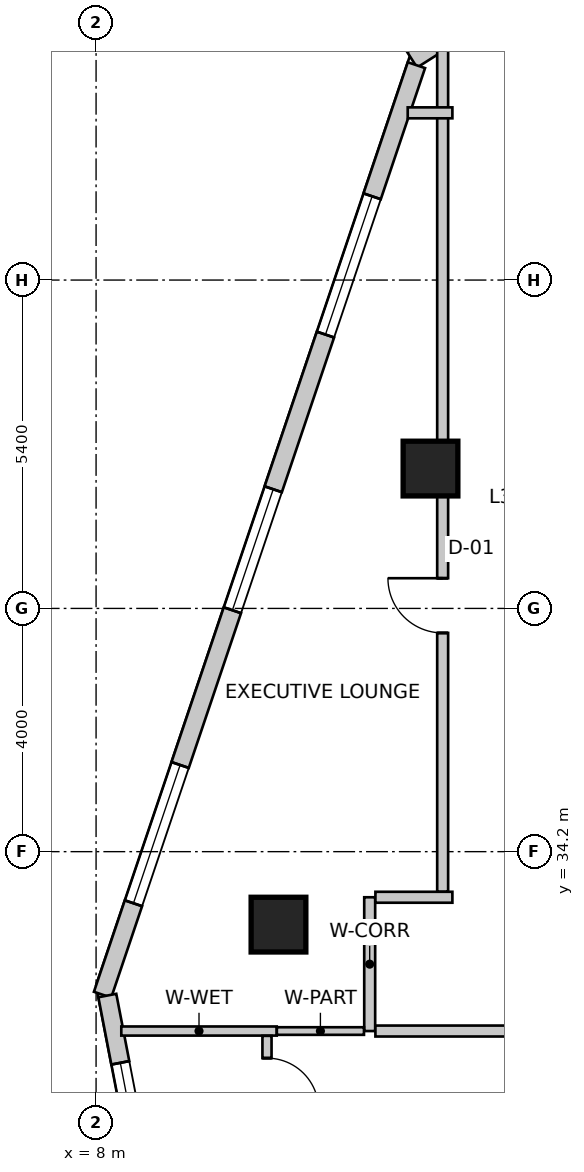
"""IFC4 building model, lengths in metres.
Left out: names, types, materials, properties, quantities, classifications, styles, units other than length and angle.
Written with IfcOpenShell. Run it as: python <this file> out.ifc"""

import sys

from ifc_helpers import new_model, si_unit, direction, frame, frame_2d, origin, origin_2d, place, context, subcontext, project, spatial, rectangle, extrude, source, transform, mapped, element, fill, save


model = new_model("IFC4")
c1 = context("Model", 3, precision=1e-05, world=origin(), true_north=direction((0.0, 1.0)))
c2 = subcontext(c1, "Body", "Model", "MODEL_VIEW")
j1 = project(units=[si_unit("LENGTHUNIT", "METRE"), si_unit("PLANEANGLEUNIT", "RADIAN")], contexts=[c1])
p1 = place(None, origin())
s1 = spatial("IfcSite", under=j1, at=p1, CompositionType="ELEMENT")
p2 = place(p1, origin())
s2 = spatial("IfcBuilding", under=s1, at=p2, CompositionType="ELEMENT")
p3 = place(p2, frame((0.0, 0.0, 125.0)))
s3 = spatial("IfcBuildingStorey", under=s2, at=p3, CompositionType="ELEMENT", Elevation=125.0)
m1 = source(origin(), c2, "Body", "SweptSolid", [
    extrude(rectangle(XDim=0.9, YDim=0.9, at=origin_2d()), origin(), (0.0, 0.0, 1.0), 3.6),
])
for number, where, z_axis, x_axis in (
    (1, (11.0, 33.0, 0.0), (0.0, 0.0, 1.0), (1.0, 0.0, 0.0)),
    (2, (13.5, 40.5, 0.0), (0.0, 0.0, 1.0), (1.0, 0.0, 0.0)),
):
    element("IfcColumn", number, at=place(p3, frame(where, z_axis=z_axis, x_axis=x_axis)), inside=s3, PredefinedType="COLUMN", context=c2, shape_type="MappedRepresentation", body=[
        mapped(m1, transform((0.0, 0.0, 0.0), scale=1.0)),
    ])
p4 = place(p3, frame((21.875, 52.742, 0.0), z_axis=(0.0, 0.0, 1.0), x_axis=(-0.843662465249, -0.536873956092, 0.0)))
e3 = element("IfcWall", 3, at=p4, inside=s3, PredefinedType="SOLIDWALL", context=c2, shape_type="SweptSolid", body=[
    extrude(rectangle(XDim=10.284, YDim=0.3, at=frame_2d((5.142, 0.0))), origin(), (0.0, 0.0, 1.0), 3.35),
])
m2 = source(origin(), c2, "Body", "SweptSolid", [
    extrude(rectangle(XDim=2.1, YDim=2.0, at=frame_2d((1.05, 1.0))), frame((0.0, 0.16, 0.0), z_axis=(0.0, -1.0, 0.0), x_axis=(1.0, 0.0, 0.0)), (0.0, 0.0, 1.0), 0.32),
])
p5 = place(p4, frame((2.806, 0.0, 0.85)))
e4 = element("IfcOpeningElement", 4, at=p5, cuts=e3, PredefinedType="OPENING", context=c2, shape_type="MappedRepresentation", body=[
    mapped(m2, transform((0.0, 0.0, 0.0), scale=1.0)),
])
m3 = source(origin(), c2, "Body", "SweptSolid", [
    extrude(rectangle(XDim=1.2, YDim=1.6, at=frame_2d((0.6, 0.8))), frame((0.0, 0.16, 0.0), z_axis=(0.0, -1.0, 0.0), x_axis=(1.0, 0.0, 0.0)), (0.0, 0.0, 1.0), 0.32),
])
p6 = place(p4, frame((8.087, 0.0, 0.85)))
e5 = element("IfcOpeningElement", 5, at=p6, cuts=e3, PredefinedType="OPENING", context=c2, shape_type="MappedRepresentation", body=[
    mapped(m3, transform((0.0, 0.0, 0.0), scale=1.0)),
])
p7 = place(p3, frame((13.269, 47.134, 0.0), z_axis=(0.0, 0.0, 1.0), x_axis=(-0.319929596295, -0.947441319246, 0.0)))
e6 = element("IfcWall", 6, at=p7, inside=s3, PredefinedType="SOLIDWALL", context=c2, shape_type="SweptSolid", body=[
    extrude(rectangle(XDim=16.134, YDim=0.3, at=frame_2d((8.067, 0.0))), origin(), (0.0, 0.0, 1.0), 3.35),
])
m4 = source(origin(), c2, "Body", "SweptSolid", [
    extrude(rectangle(XDim=2.4, YDim=2.2, at=frame_2d((1.2, 1.1))), frame((0.0, 0.16, 0.0), z_axis=(0.0, -1.0, 0.0), x_axis=(1.0, 0.0, 0.0)), (0.0, 0.0, 1.0), 0.32),
])
p8 = place(p7, frame((2.276, 0.0, 0.85)))
e7 = element("IfcOpeningElement", 7, at=p8, cuts=e6, PredefinedType="OPENING", context=c2, shape_type="MappedRepresentation", body=[
    mapped(m4, transform((0.0, 0.0, 0.0), scale=1.0)),
])
p9 = place(p7, frame((7.361, 0.0, 0.85)))
e8 = element("IfcOpeningElement", 8, at=p9, cuts=e6, PredefinedType="OPENING", context=c2, shape_type="MappedRepresentation", body=[
    mapped(m2, transform((0.0, 0.0, 0.0), scale=1.0)),
])
p10 = place(p7, frame((12.147, 0.0, 0.85)))
e9 = element("IfcOpeningElement", 9, at=p10, cuts=e6, PredefinedType="OPENING", context=c2, shape_type="MappedRepresentation", body=[
    mapped(m4, transform((0.0, 0.0, 0.0), scale=1.0)),
])
p11 = place(p3, frame((8.185, 31.834, 0.0), z_axis=(0.0, 0.0, 1.0), x_axis=(0.189707113148, -0.981840725994, 0.0)))
e10 = element("IfcWall", 10, at=p11, inside=s3, PredefinedType="SOLIDWALL", context=c2, shape_type="SweptSolid", body=[
    extrude(rectangle(XDim=21.221, YDim=0.3, at=frame_2d((10.611, 0.0))), origin(), (0.0, 0.0, 1.0), 3.35),
])
p12 = place(p11, frame((1.127, 0.0, 0.85)))
e11 = element("IfcOpeningElement", 11, at=p12, cuts=e10, PredefinedType="OPENING", context=c2, shape_type="MappedRepresentation", body=[
    mapped(m3, transform((0.0, 0.0, 0.0), scale=1.0)),
])
p13 = place(p11, frame((4.369, 0.0, 0.85)))
e12 = element("IfcOpeningElement", 12, at=p13, cuts=e10, PredefinedType="OPENING", context=c2, shape_type="MappedRepresentation", body=[
    mapped(m2, transform((0.0, 0.0, 0.0), scale=1.0)),
])
p14 = place(p11, frame((8.409, 0.0, 0.85)))
e13 = element("IfcOpeningElement", 13, at=p14, cuts=e10, PredefinedType="OPENING", context=c2, shape_type="MappedRepresentation", body=[
    mapped(m3, transform((0.0, 0.0, 0.0), scale=1.0)),
])
m5 = source(origin(), c2, "Body", "SweptSolid", [
    extrude(rectangle(XDim=1.5, YDim=1.8, at=frame_2d((0.75, 0.9))), frame((0.0, 0.16, 0.0), z_axis=(0.0, -1.0, 0.0), x_axis=(1.0, 0.0, 0.0)), (0.0, 0.0, 1.0), 0.32),
])
p15 = place(p11, frame((10.551, 0.0, 0.85)))
e14 = element("IfcOpeningElement", 14, at=p15, cuts=e10, PredefinedType="OPENING", context=c2, shape_type="MappedRepresentation", body=[
    mapped(m5, transform((0.0, 0.0, 0.0), scale=1.0)),
])
p16 = place(p11, frame((12.992, 0.0, 0.85)))
e15 = element("IfcOpeningElement", 15, at=p16, cuts=e10, PredefinedType="OPENING", context=c2, shape_type="MappedRepresentation", body=[
    mapped(m3, transform((0.0, 0.0, 0.0), scale=1.0)),
])
p17 = place(p11, frame((16.811, 0.0, 0.85)))
e16 = element("IfcOpeningElement", 16, at=p17, cuts=e10, PredefinedType="OPENING", context=c2, shape_type="MappedRepresentation", body=[
    mapped(m2, transform((0.0, 0.0, 0.0), scale=1.0)),
])
p18 = place(p3, frame((12.5, 31.25, 0.0), z_axis=(0.0, 0.0, 1.0), x_axis=(0.0, 1.0, 0.0)))
e17 = element("IfcWall", 17, at=p18, inside=s3, PredefinedType="PARTITIONING", context=c2, shape_type="SweptSolid", body=[
    extrude(rectangle(XDim=2.2, YDim=0.18, at=frame_2d((1.1, 0.0))), origin(), (0.0, 0.0, 1.0), 2.935),
])
p19 = place(p3, frame((12.594, 33.45, 0.0), z_axis=(0.0, 0.0, 1.0), x_axis=(1.0, 0.0, 0.0)))
e18 = element("IfcWall", 18, at=p19, inside=s3, PredefinedType="PARTITIONING", context=c2, shape_type="SweptSolid", body=[
    extrude(rectangle(XDim=1.266, YDim=0.18, at=frame_2d((0.633, 0.0))), origin(), (0.0, 0.0, 1.0), 3.35),
])
p20 = place(p3, frame((17.96, 31.25, 0.0), z_axis=(0.0, 0.0, 1.0), x_axis=(-1.0, 0.0, 0.0)))
e19 = element("IfcWall", 19, at=p20, inside=s3, PredefinedType="PARTITIONING", context=c2, shape_type="SweptSolid", body=[
    extrude(rectangle(XDim=5.366, YDim=0.18, at=frame_2d((2.683, 0.0))), origin(), (0.0, 0.0, 1.0), 2.935),
])
p21 = place(p3, frame((13.7, 33.544, 0.0), z_axis=(0.0, 0.0, 1.0), x_axis=(0.0, 1.0, 0.0)))
e20 = element("IfcWall", 20, at=p21, inside=s3, PredefinedType="PARTITIONING", context=c2, shape_type="SweptSolid", body=[
    extrude(rectangle(XDim=13.86, YDim=0.18, at=frame_2d((6.93, 0.0))), origin(), (0.0, 0.0, 1.0), 2.492),
])
m6 = source(origin(), c2, "Body", "SweptSolid", [
    extrude(rectangle(XDim=0.9, YDim=2.15, at=frame_2d((0.45, 1.075))), frame((0.0, 0.1, 0.0), z_axis=(0.0, -1.0, 0.0), x_axis=(1.0, 0.0, 0.0)), (0.0, 0.0, 1.0), 0.2),
])
p22 = place(p21, frame((4.253, 0.0, 0.0)))
e21 = element("IfcOpeningElement", 21, at=p22, cuts=e20, PredefinedType="OPENING", context=c2, shape_type="MappedRepresentation", body=[
    mapped(m6, transform((0.0, 0.0, 0.0), scale=1.0)),
])
p23 = place(p3, frame((13.86, 46.35, 0.0), z_axis=(0.0, 0.0, 1.0), x_axis=(-1.0, 0.0, 0.0)))
e22 = element("IfcWall", 22, at=p23, inside=s3, PredefinedType="PARTITIONING", context=c2, shape_type="SweptSolid", body=[
    extrude(rectangle(XDim=0.735, YDim=0.18, at=frame_2d((0.367, 0.0))), origin(), (0.0, 0.0, 1.0), 3.35),
])
p24 = place(p3, frame((10.971, 31.25, 0.0), z_axis=(0.0, 0.0, 1.0), x_axis=(-1.0, 0.0, 0.0)))
e23 = element("IfcWall", 23, at=p24, inside=s3, PredefinedType="PARTITIONING", context=c2, shape_type="SweptSolid", body=[
    extrude(rectangle(XDim=2.556, YDim=0.15, at=frame_2d((1.278, 0.0))), origin(), (0.0, 0.0, 1.0), 2.492),
])
p25 = place(p3, frame((12.406, 31.25, 0.0), z_axis=(0.0, 0.0, 1.0), x_axis=(-1.0, 0.0, 0.0)))
e24 = element("IfcWall", 24, at=p25, inside=s3, PredefinedType="PARTITIONING", context=c2, shape_type="SweptSolid", body=[
    extrude(rectangle(XDim=1.433, YDim=0.125, at=frame_2d((0.717, 0.0))), origin(), (0.0, 0.0, 1.0), 2.492),
])
p26 = place(p3, frame((10.811, 31.171, 0.0), z_axis=(0.0, 0.0, 1.0), x_axis=(0.0, -1.0, 0.0)))
e25 = element("IfcWall", 25, at=p26, inside=s3, PredefinedType="PARTITIONING", context=c2, shape_type="SweptSolid", body=[
    extrude(rectangle(XDim=2.101, YDim=0.15, at=frame_2d((1.05, 0.0))), origin(), (0.0, 0.0, 1.0), 2.492),
])
m7 = source(origin(), c2, "Body", "SweptSolid", [
    extrude(rectangle(XDim=0.85, YDim=2.15, at=frame_2d((0.425, 1.075))), frame((0.0, 0.085, 0.0), z_axis=(0.0, -1.0, 0.0), x_axis=(1.0, 0.0, 0.0)), (0.0, 0.0, 1.0), 0.17),
])
p27 = place(p26, frame((0.366, 0.0, 0.0)))
e26 = element("IfcOpeningElement", 26, at=p27, cuts=e25, PredefinedType="OPENING", context=c2, shape_type="MappedRepresentation", body=[
    mapped(m7, transform((0.0, 0.0, 0.0), scale=1.0)),
])
m8 = source(origin(), c2, "Body", "SweptSolid", [
    extrude(rectangle(XDim=2.4, YDim=2.2, at=frame_2d((1.2, 1.1))), frame((0.0, -0.015, 0.0), z_axis=(0.0, -1.0, 0.0), x_axis=(1.0, 0.0, 0.0)), (0.0, 0.0, 1.0), 0.06),
])
p28 = place(p8, origin())
e27 = element("IfcWindow", 27, at=p28, inside=s3, PartitioningType="SINGLE_PANEL", PredefinedType="WINDOW", context=c2, shape_type="MappedRepresentation", body=[
    mapped(m8, transform((0.0, 0.0, 0.0), scale=1.0)),
])
fill(e7, e27)
m9 = source(origin(), c2, "Body", "SweptSolid", [
    extrude(rectangle(XDim=2.1, YDim=2.0, at=frame_2d((1.05, 1.0))), frame((0.0, -0.015, 0.0), z_axis=(0.0, -1.0, 0.0), x_axis=(1.0, 0.0, 0.0)), (0.0, 0.0, 1.0), 0.06),
])
p29 = place(p9, origin())
e28 = element("IfcWindow", 28, at=p29, inside=s3, PartitioningType="SINGLE_PANEL", PredefinedType="WINDOW", context=c2, shape_type="MappedRepresentation", body=[
    mapped(m9, transform((0.0, 0.0, 0.0), scale=1.0)),
])
fill(e8, e28)
p30 = place(p10, origin())
e29 = element("IfcWindow", 29, at=p30, inside=s3, PartitioningType="SINGLE_PANEL", PredefinedType="WINDOW", context=c2, shape_type="MappedRepresentation", body=[
    mapped(m8, transform((0.0, 0.0, 0.0), scale=1.0)),
])
fill(e9, e29)
m10 = source(origin(), c2, "Body", "SweptSolid", [
    extrude(rectangle(XDim=1.2, YDim=1.6, at=frame_2d((0.6, 0.8))), frame((0.0, -0.015, 0.0), z_axis=(0.0, -1.0, 0.0), x_axis=(1.0, 0.0, 0.0)), (0.0, 0.0, 1.0), 0.06),
])
p31 = place(p12, origin())
e30 = element("IfcWindow", 30, at=p31, inside=s3, PartitioningType="SINGLE_PANEL", PredefinedType="WINDOW", context=c2, shape_type="MappedRepresentation", body=[
    mapped(m10, transform((0.0, 0.0, 0.0), scale=1.0)),
])
fill(e11, e30)
m11 = source(origin(), c2, "Body", "SweptSolid", [
    extrude(rectangle(XDim=0.9, YDim=2.15, at=frame_2d((0.45, 1.075))), frame((0.0, 0.025, 0.0), z_axis=(0.0, -1.0, 0.0), x_axis=(1.0, 0.0, 0.0)), (0.0, 0.0, 1.0), 0.05),
])
p32 = place(p22, origin())
e31 = element("IfcDoor", 31, at=p32, inside=s3, OperationType="SINGLE_SWING_RIGHT", PredefinedType="DOOR", context=c2, shape_type="MappedRepresentation", body=[
    mapped(m11, transform((0.0, 0.0, 0.0), scale=1.0)),
])
fill(e21, e31)
m12 = source(origin(), c2, "Body", "SweptSolid", [
    extrude(rectangle(XDim=0.85, YDim=2.15, at=frame_2d((0.425, 1.075))), frame((0.0, 0.025, 0.0), z_axis=(0.0, -1.0, 0.0), x_axis=(1.0, 0.0, 0.0)), (0.0, 0.0, 1.0), 0.05),
])
p33 = place(p27, origin())
e32 = element("IfcDoor", 32, at=p33, inside=s3, OperationType="SINGLE_SWING_RIGHT", PredefinedType="DOOR", context=c2, shape_type="MappedRepresentation", body=[
    mapped(m12, transform((0.0, 0.0, 0.0), scale=1.0)),
])
fill(e26, e32)
save(model, sys.argv[1])
